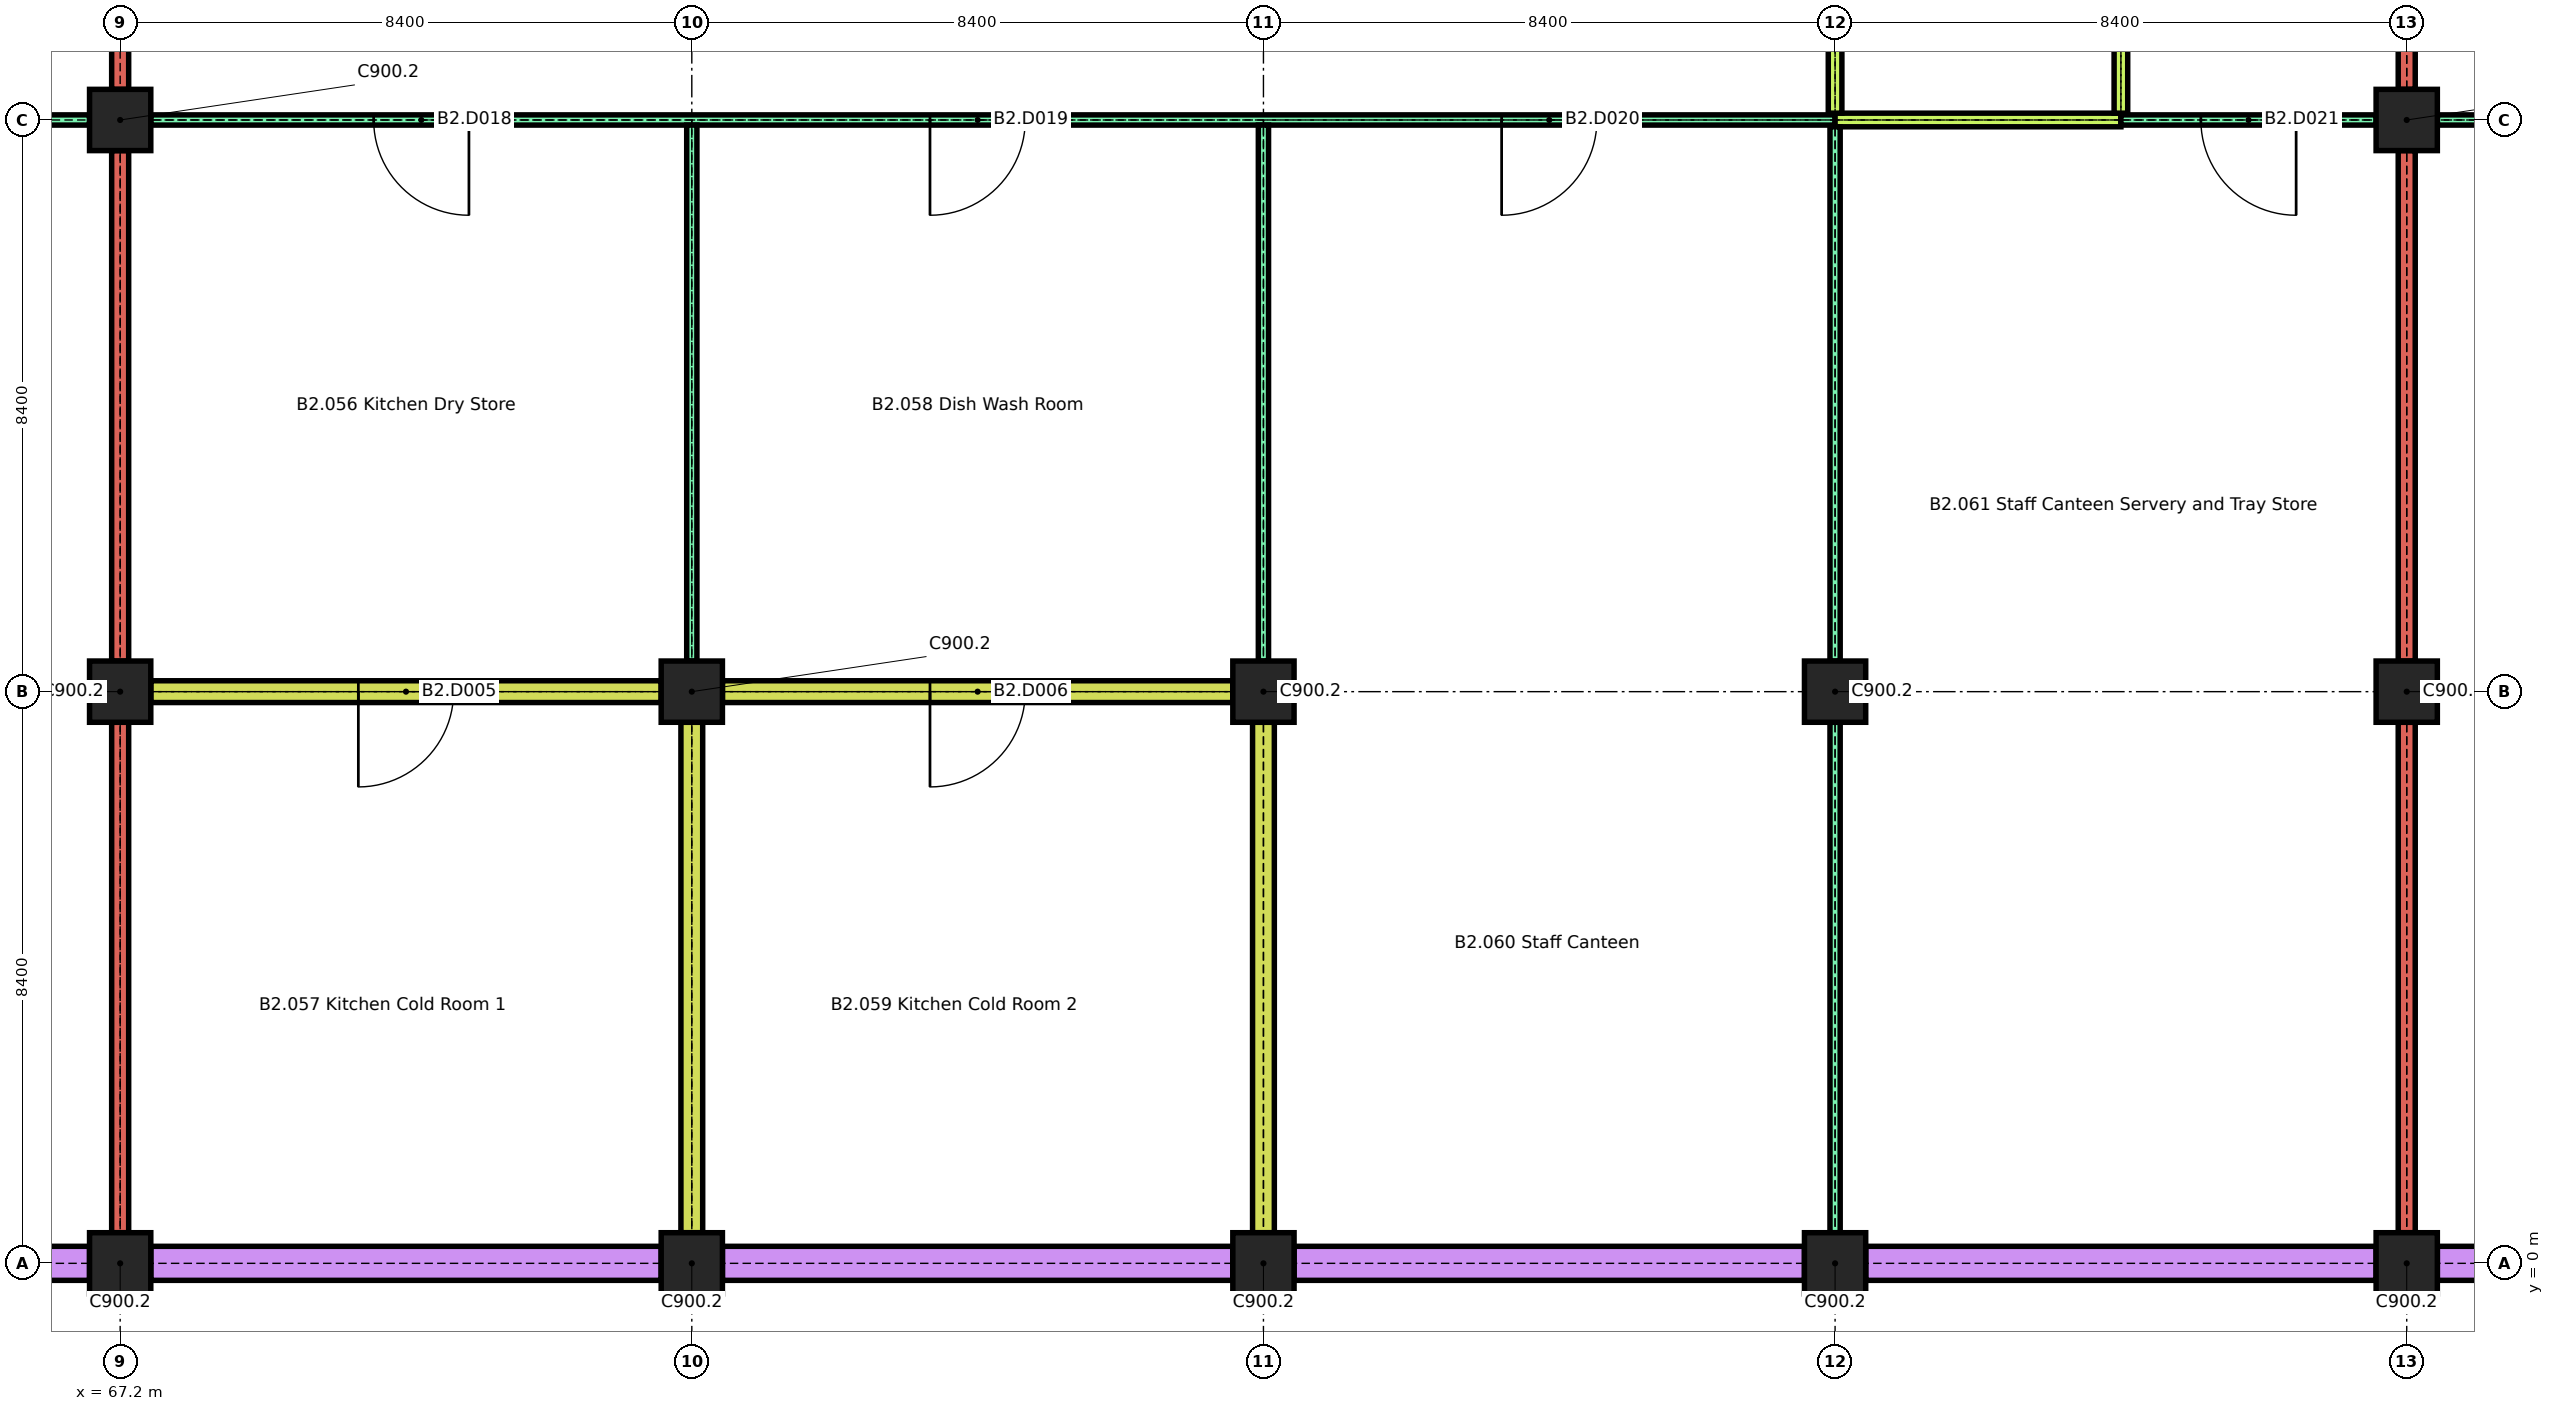
"""IFC4 building model, lengths in metres.
Left out: names, types, materials, properties, quantities, classifications, styles, units other than length and angle.
Written with IfcOpenShell. Run it as: python <this file> out.ifc"""

import sys

from ifc_helpers import new_model, si_unit, direction, frame, frame_2d, origin, origin_2d, place, context, subcontext, project, spatial, rectangle, extrude, element, fill, save


model = new_model("IFC4")
c1 = context("Model", 3, precision=1e-05, world=origin(), true_north=direction((0.0, 1.0)))
c2 = subcontext(c1, "Body", "Model", "MODEL_VIEW")
j1 = project(units=[si_unit("LENGTHUNIT", "METRE"), si_unit("PLANEANGLEUNIT", "RADIAN")], contexts=[c1])
p1 = place(None, origin())
s1 = spatial("IfcSite", under=j1, at=p1, CompositionType="ELEMENT")
p2 = place(p1, origin())
s2 = spatial("IfcBuilding", under=s1, at=p2, CompositionType="ELEMENT")
p3 = place(p2, frame((0.0, 0.0, -7.8)))
s3 = spatial("IfcBuildingStorey", under=s2, at=p3, CompositionType="ELEMENT", Elevation=-7.8)
for number, where, z_axis, x_axis in (
    (1, (67.2, 0.0, 0.0), (0.0, 0.0, 1.0), (1.0, 0.0, 0.0)),
    (2, (75.6, 0.0, 0.0), (0.0, 0.0, 1.0), (1.0, 0.0, 0.0)),
    (3, (84.0, 0.0, 0.0), (0.0, 0.0, 1.0), (1.0, 0.0, 0.0)),
    (4, (92.4, 0.0, 0.0), (0.0, 0.0, 1.0), (1.0, 0.0, 0.0)),
    (5, (100.8, 0.0, 0.0), (0.0, 0.0, 1.0), (1.0, 0.0, 0.0)),
    (6, (67.2, 8.4, 0.0), (0.0, 0.0, 1.0), (1.0, 0.0, 0.0)),
    (7, (75.6, 8.4, 0.0), (0.0, 0.0, 1.0), (1.0, 0.0, 0.0)),
    (8, (84.0, 8.4, 0.0), (0.0, 0.0, 1.0), (1.0, 0.0, 0.0)),
    (9, (92.4, 8.4, 0.0), (0.0, 0.0, 1.0), (1.0, 0.0, 0.0)),
    (10, (100.8, 8.4, 0.0), (0.0, 0.0, 1.0), (1.0, 0.0, 0.0)),
    (11, (67.2, 16.8, 0.0), (0.0, 0.0, 1.0), (1.0, 0.0, 0.0)),
    (12, (100.8, 16.8, 0.0), (0.0, 0.0, 1.0), (1.0, 0.0, 0.0)),
):
    element("IfcColumn", number, at=place(p3, frame(where, z_axis=z_axis, x_axis=x_axis)), inside=s3, PredefinedType="COLUMN", context=c2, shape_type="SweptSolid", body=[
        extrude(rectangle(XDim=0.9, YDim=0.9, at=origin_2d()), origin(), (0.0, 0.0, 1.0), 3.1),
    ])
for number, where, z_axis, x_axis in (
    (13, (59.25, 0.0, 0.0), (0.0, 0.0, 1.0), (1.0, 0.0, 0.0)),
    (14, (67.65, 0.0, 0.0), (0.0, 0.0, 1.0), (1.0, 0.0, 0.0)),
    (15, (76.05, 0.0, 0.0), (0.0, 0.0, 1.0), (1.0, 0.0, 0.0)),
    (16, (84.45, 0.0, 0.0), (0.0, 0.0, 1.0), (1.0, 0.0, 0.0)),
    (17, (92.85, 0.0, 0.0), (0.0, 0.0, 1.0), (1.0, 0.0, 0.0)),
    (18, (101.25, 0.0, 0.0), (0.0, 0.0, 1.0), (1.0, 0.0, 0.0)),
):
    element("IfcWall", number, at=place(p3, frame(where, z_axis=z_axis, x_axis=x_axis)), inside=s3, PredefinedType="SOLIDWALL", context=c2, shape_type="SweptSolid", body=[
        extrude(rectangle(XDim=7.5, YDim=0.5, at=frame_2d((3.75, 0.0))), origin(), (0.0, 0.0, 1.0), 3.1),
    ])
p4 = place(p3, frame((67.65, 8.4, 0.0), z_axis=(0.0, 0.0, 1.0), x_axis=(1.0, 0.0, 0.0)))
e19 = element("IfcWall", 19, at=p4, inside=s3, PredefinedType="SOLIDWALL", context=c2, shape_type="SweptSolid", body=[
    extrude(rectangle(XDim=7.5, YDim=0.32, at=frame_2d((3.75, 0.0))), origin(), (0.0, 0.0, 1.0), 3.1),
])
p5 = place(p4, frame((3.05, 0.0, 0.0)))
e20 = element("IfcOpeningElement", 20, at=p5, cuts=e19, PredefinedType="OPENING", context=c2, shape_type="SweptSolid", body=[
    extrude(rectangle(XDim=1.4, YDim=2.1, at=frame_2d((0.7, 1.05))), frame((0.0, 0.17, 0.0), z_axis=(0.0, -1.0, 0.0), x_axis=(1.0, 0.0, 0.0)), (0.0, 0.0, 1.0), 0.34),
])
p6 = place(p3, frame((76.05, 8.4, 0.0), z_axis=(0.0, 0.0, 1.0), x_axis=(1.0, 0.0, 0.0)))
e21 = element("IfcWall", 21, at=p6, inside=s3, PredefinedType="SOLIDWALL", context=c2, shape_type="SweptSolid", body=[
    extrude(rectangle(XDim=7.5, YDim=0.32, at=frame_2d((3.75, 0.0))), origin(), (0.0, 0.0, 1.0), 3.1),
])
p7 = place(p6, frame((3.05, 0.0, 0.0)))
e22 = element("IfcOpeningElement", 22, at=p7, cuts=e21, PredefinedType="OPENING", context=c2, shape_type="SweptSolid", body=[
    extrude(rectangle(XDim=1.4, YDim=2.1, at=frame_2d((0.7, 1.05))), frame((0.0, 0.17, 0.0), z_axis=(0.0, -1.0, 0.0), x_axis=(1.0, 0.0, 0.0)), (0.0, 0.0, 1.0), 0.34),
])
p8 = place(p3, frame((59.25, 16.8, 0.0), z_axis=(0.0, 0.0, 1.0), x_axis=(1.0, 0.0, 0.0)))
e23 = element("IfcWall", 23, at=p8, inside=s3, PredefinedType="PARTITIONING", context=c2, shape_type="SweptSolid", body=[
    extrude(rectangle(XDim=7.5, YDim=0.15, at=frame_2d((3.75, 0.0))), origin(), (0.0, 0.0, 1.0), 3.1),
])
p9 = place(p8, frame((3.05, 0.0, 0.0)))
e24 = element("IfcOpeningElement", 24, at=p9, cuts=e23, PredefinedType="OPENING", context=c2, shape_type="SweptSolid", body=[
    extrude(rectangle(XDim=1.4, YDim=2.1, at=frame_2d((0.7, 1.05))), frame((0.0, 0.085, 0.0), z_axis=(0.0, -1.0, 0.0), x_axis=(1.0, 0.0, 0.0)), (0.0, 0.0, 1.0), 0.17),
])
p10 = place(p3, frame((67.65, 16.8, 0.0), z_axis=(0.0, 0.0, 1.0), x_axis=(1.0, 0.0, 0.0)))
e25 = element("IfcWall", 25, at=p10, inside=s3, PredefinedType="PARTITIONING", context=c2, shape_type="SweptSolid", body=[
    extrude(rectangle(XDim=24.75, YDim=0.15, at=frame_2d((12.375, 0.0))), origin(), (0.0, 0.0, 1.0), 3.1),
])
p11 = place(p10, frame((3.275, 0.0, 0.0)))
e26 = element("IfcOpeningElement", 26, at=p11, cuts=e25, PredefinedType="OPENING", context=c2, shape_type="SweptSolid", body=[
    extrude(rectangle(XDim=1.4, YDim=2.1, at=frame_2d((0.7, 1.05))), frame((0.0, 0.085, 0.0), z_axis=(0.0, -1.0, 0.0), x_axis=(1.0, 0.0, 0.0)), (0.0, 0.0, 1.0), 0.17),
])
p12 = place(p10, frame((11.45, 0.0, 0.0)))
e27 = element("IfcOpeningElement", 27, at=p12, cuts=e25, PredefinedType="OPENING", context=c2, shape_type="SweptSolid", body=[
    extrude(rectangle(XDim=1.4, YDim=2.1, at=frame_2d((0.7, 1.05))), frame((0.0, 0.085, 0.0), z_axis=(0.0, -1.0, 0.0), x_axis=(1.0, 0.0, 0.0)), (0.0, 0.0, 1.0), 0.17),
])
p13 = place(p10, frame((19.85, 0.0, 0.0)))
e28 = element("IfcOpeningElement", 28, at=p13, cuts=e25, PredefinedType="OPENING", context=c2, shape_type="SweptSolid", body=[
    extrude(rectangle(XDim=1.4, YDim=2.1, at=frame_2d((0.7, 1.05))), frame((0.0, 0.085, 0.0), z_axis=(0.0, -1.0, 0.0), x_axis=(1.0, 0.0, 0.0)), (0.0, 0.0, 1.0), 0.17),
])
p14 = place(p3, frame((92.4, 16.8, 0.0), z_axis=(0.0, 0.0, 1.0), x_axis=(1.0, 0.0, 0.0)))
e29 = element("IfcWall", 29, at=p14, inside=s3, PredefinedType="PARTITIONING", context=c2, shape_type="SweptSolid", body=[
    extrude(rectangle(XDim=4.2, YDim=0.2, at=frame_2d((2.1, 0.0))), origin(), (0.0, 0.0, 1.0), 3.1),
])
p15 = place(p3, frame((96.6, 16.8, 0.0), z_axis=(0.0, 0.0, 1.0), x_axis=(1.0, 0.0, 0.0)))
e30 = element("IfcWall", 30, at=p15, inside=s3, PredefinedType="PARTITIONING", context=c2, shape_type="SweptSolid", body=[
    extrude(rectangle(XDim=3.75, YDim=0.15, at=frame_2d((1.875, 0.0))), origin(), (0.0, 0.0, 1.0), 3.1),
])
p16 = place(p15, frame((1.175, 0.0, 0.0)))
e31 = element("IfcOpeningElement", 31, at=p16, cuts=e30, PredefinedType="OPENING", context=c2, shape_type="SweptSolid", body=[
    extrude(rectangle(XDim=1.4, YDim=2.1, at=frame_2d((0.7, 1.05))), frame((0.0, 0.085, 0.0), z_axis=(0.0, -1.0, 0.0), x_axis=(1.0, 0.0, 0.0)), (0.0, 0.0, 1.0), 0.17),
])
p17 = place(p3, frame((101.25, 16.8, 0.0), z_axis=(0.0, 0.0, 1.0), x_axis=(1.0, 0.0, 0.0)))
e32 = element("IfcWall", 32, at=p17, inside=s3, PredefinedType="PARTITIONING", context=c2, shape_type="SweptSolid", body=[
    extrude(rectangle(XDim=7.5, YDim=0.15, at=frame_2d((3.75, 0.0))), origin(), (0.0, 0.0, 1.0), 3.1),
])
p18 = place(p17, frame((3.05, 0.0, 0.0)))
e33 = element("IfcOpeningElement", 33, at=p18, cuts=e32, PredefinedType="OPENING", context=c2, shape_type="SweptSolid", body=[
    extrude(rectangle(XDim=1.4, YDim=2.1, at=frame_2d((0.7, 1.05))), frame((0.0, 0.085, 0.0), z_axis=(0.0, -1.0, 0.0), x_axis=(1.0, 0.0, 0.0)), (0.0, 0.0, 1.0), 0.17),
])
for number, where, z_axis, x_axis in (
    (34, (67.2, 0.45, 0.0), (0.0, 0.0, 1.0), (0.0, 1.0, 0.0)),
    (35, (67.2, 8.85, 0.0), (0.0, 0.0, 1.0), (0.0, 1.0, 0.0)),
):
    element("IfcWall", number, at=place(p3, frame(where, z_axis=z_axis, x_axis=x_axis)), inside=s3, PredefinedType="SOLIDWALL", context=c2, shape_type="SweptSolid", body=[
        extrude(rectangle(XDim=7.5, YDim=0.25, at=frame_2d((3.75, 0.0))), origin(), (0.0, 0.0, 1.0), 3.1),
    ])
p19 = place(p3, frame((67.2, 17.25, 0.0), z_axis=(0.0, 0.0, 1.0), x_axis=(0.0, 1.0, 0.0)))
e36 = element("IfcWall", 36, at=p19, inside=s3, PredefinedType="SOLIDWALL", context=c2, shape_type="SweptSolid", body=[
    extrude(rectangle(XDim=12.75, YDim=0.25, at=frame_2d((6.375, 0.0))), origin(), (0.0, 0.0, 1.0), 3.1),
])
p20 = place(p19, frame((1.175, 0.0, 0.0)))
e37 = element("IfcOpeningElement", 37, at=p20, cuts=e36, PredefinedType="OPENING", context=c2, shape_type="SweptSolid", body=[
    extrude(rectangle(XDim=2.0, YDim=2.4, at=frame_2d((1.0, 1.2))), frame((0.0, 0.135, 0.0), z_axis=(0.0, -1.0, 0.0), x_axis=(1.0, 0.0, 0.0)), (0.0, 0.0, 1.0), 0.27),
])
p21 = place(p3, frame((75.6, 0.45, 0.0), z_axis=(0.0, 0.0, 1.0), x_axis=(0.0, 1.0, 0.0)))
e38 = element("IfcWall", 38, at=p21, inside=s3, PredefinedType="SOLIDWALL", context=c2, shape_type="SweptSolid", body=[
    extrude(rectangle(XDim=7.5, YDim=0.32, at=frame_2d((3.75, 0.0))), origin(), (0.0, 0.0, 1.0), 3.1),
])
p22 = place(p3, frame((75.6, 8.85, 0.0), z_axis=(0.0, 0.0, 1.0), x_axis=(0.0, 1.0, 0.0)))
e39 = element("IfcWall", 39, at=p22, inside=s3, PredefinedType="PARTITIONING", context=c2, shape_type="SweptSolid", body=[
    extrude(rectangle(XDim=7.875, YDim=0.15, at=frame_2d((3.938, 0.0))), origin(), (0.0, 0.0, 1.0), 3.1),
])
p23 = place(p3, frame((84.0, 0.45, 0.0), z_axis=(0.0, 0.0, 1.0), x_axis=(0.0, 1.0, 0.0)))
e40 = element("IfcWall", 40, at=p23, inside=s3, PredefinedType="SOLIDWALL", context=c2, shape_type="SweptSolid", body=[
    extrude(rectangle(XDim=7.5, YDim=0.32, at=frame_2d((3.75, 0.0))), origin(), (0.0, 0.0, 1.0), 3.1),
])
p24 = place(p3, frame((84.0, 8.85, 0.0), z_axis=(0.0, 0.0, 1.0), x_axis=(0.0, 1.0, 0.0)))
e41 = element("IfcWall", 41, at=p24, inside=s3, PredefinedType="PARTITIONING", context=c2, shape_type="SweptSolid", body=[
    extrude(rectangle(XDim=7.875, YDim=0.15, at=frame_2d((3.938, 0.0))), origin(), (0.0, 0.0, 1.0), 3.1),
])
p25 = place(p3, frame((92.4, 0.45, 0.0), z_axis=(0.0, 0.0, 1.0), x_axis=(0.0, 1.0, 0.0)))
e42 = element("IfcWall", 42, at=p25, inside=s3, PredefinedType="PARTITIONING", context=c2, shape_type="SweptSolid", body=[
    extrude(rectangle(XDim=7.5, YDim=0.15, at=frame_2d((3.75, 0.0))), origin(), (0.0, 0.0, 1.0), 3.1),
])
p26 = place(p3, frame((92.4, 8.85, 0.0), z_axis=(0.0, 0.0, 1.0), x_axis=(0.0, 1.0, 0.0)))
e43 = element("IfcWall", 43, at=p26, inside=s3, PredefinedType="PARTITIONING", context=c2, shape_type="SweptSolid", body=[
    extrude(rectangle(XDim=7.85, YDim=0.15, at=frame_2d((3.925, 0.0))), origin(), (0.0, 0.0, 1.0), 3.1),
])
p27 = place(p3, frame((92.4, 16.9, 0.0), z_axis=(0.0, 0.0, 1.0), x_axis=(0.0, 1.0, 0.0)))
e44 = element("IfcWall", 44, at=p27, inside=s3, PredefinedType="PARTITIONING", context=c2, shape_type="SweptSolid", body=[
    extrude(rectangle(XDim=4.5, YDim=0.2, at=frame_2d((2.25, 0.0))), origin(), (0.0, 0.0, 1.0), 3.1),
])
p28 = place(p27, frame((1.25, 0.0, 0.0)))
e45 = element("IfcOpeningElement", 45, at=p28, cuts=e44, PredefinedType="OPENING", context=c2, shape_type="SweptSolid", body=[
    extrude(rectangle(XDim=2.0, YDim=2.4, at=frame_2d((1.0, 1.2))), frame((0.0, 0.11, 0.0), z_axis=(0.0, -1.0, 0.0), x_axis=(1.0, 0.0, 0.0)), (0.0, 0.0, 1.0), 0.22),
])
p29 = place(p3, frame((96.6, 16.9, 0.0), z_axis=(0.0, 0.0, 1.0), x_axis=(0.0, 1.0, 0.0)))
e46 = element("IfcWall", 46, at=p29, inside=s3, PredefinedType="PARTITIONING", context=c2, shape_type="SweptSolid", body=[
    extrude(rectangle(XDim=4.5, YDim=0.2, at=frame_2d((2.25, 0.0))), origin(), (0.0, 0.0, 1.0), 3.1),
])
p30 = place(p29, frame((1.25, 0.0, 0.0)))
e47 = element("IfcOpeningElement", 47, at=p30, cuts=e46, PredefinedType="OPENING", context=c2, shape_type="SweptSolid", body=[
    extrude(rectangle(XDim=2.0, YDim=2.4, at=frame_2d((1.0, 1.2))), frame((0.0, 0.11, 0.0), z_axis=(0.0, -1.0, 0.0), x_axis=(1.0, 0.0, 0.0)), (0.0, 0.0, 1.0), 0.22),
])
for number, where, z_axis, x_axis in (
    (48, (100.8, 0.45, 0.0), (0.0, 0.0, 1.0), (0.0, 1.0, 0.0)),
    (49, (100.8, 8.85, 0.0), (0.0, 0.0, 1.0), (0.0, 1.0, 0.0)),
):
    element("IfcWall", number, at=place(p3, frame(where, z_axis=z_axis, x_axis=x_axis)), inside=s3, PredefinedType="SOLIDWALL", context=c2, shape_type="SweptSolid", body=[
        extrude(rectangle(XDim=7.5, YDim=0.25, at=frame_2d((3.75, 0.0))), origin(), (0.0, 0.0, 1.0), 3.1),
    ])
p31 = place(p3, frame((100.8, 17.25, 0.0), z_axis=(0.0, 0.0, 1.0), x_axis=(0.0, 1.0, 0.0)))
e50 = element("IfcWall", 50, at=p31, inside=s3, PredefinedType="SOLIDWALL", context=c2, shape_type="SweptSolid", body=[
    extrude(rectangle(XDim=4.275, YDim=0.25, at=frame_2d((2.137, 0.0))), origin(), (0.0, 0.0, 1.0), 3.1),
])
p32 = place(p31, frame((1.137, 0.0, 0.0)))
e51 = element("IfcOpeningElement", 51, at=p32, cuts=e50, PredefinedType="OPENING", context=c2, shape_type="SweptSolid", body=[
    extrude(rectangle(XDim=2.0, YDim=2.4, at=frame_2d((1.0, 1.2))), frame((0.0, 0.135, 0.0), z_axis=(0.0, -1.0, 0.0), x_axis=(1.0, 0.0, 0.0)), (0.0, 0.0, 1.0), 0.27),
])
p33 = place(p5, origin())
e52 = element("IfcDoor", 52, at=p33, inside=s3, OperationType="SINGLE_SWING_LEFT", PredefinedType="DOOR", context=c2, shape_type="SweptSolid", body=[
    extrude(rectangle(XDim=1.4, YDim=2.1, at=frame_2d((0.7, 1.05))), frame((0.0, 0.05, 0.0), z_axis=(0.0, -1.0, 0.0), x_axis=(1.0, 0.0, 0.0)), (0.0, 0.0, 1.0), 0.1),
])
fill(e20, e52)
p34 = place(p7, origin())
e53 = element("IfcDoor", 53, at=p34, inside=s3, OperationType="SINGLE_SWING_LEFT", PredefinedType="DOOR", context=c2, shape_type="SweptSolid", body=[
    extrude(rectangle(XDim=1.4, YDim=2.1, at=frame_2d((0.7, 1.05))), frame((0.0, 0.05, 0.0), z_axis=(0.0, -1.0, 0.0), x_axis=(1.0, 0.0, 0.0)), (0.0, 0.0, 1.0), 0.1),
])
fill(e22, e53)
p35 = place(p11, origin())
e54 = element("IfcDoor", 54, at=p35, inside=s3, OperationType="SINGLE_SWING_RIGHT", PredefinedType="DOOR", context=c2, shape_type="SweptSolid", body=[
    extrude(rectangle(XDim=1.4, YDim=2.1, at=frame_2d((0.7, 1.05))), frame((0.0, 0.025, 0.0), z_axis=(0.0, -1.0, 0.0), x_axis=(1.0, 0.0, 0.0)), (0.0, 0.0, 1.0), 0.05),
])
fill(e26, e54)
p36 = place(p12, origin())
e55 = element("IfcDoor", 55, at=p36, inside=s3, OperationType="SINGLE_SWING_LEFT", PredefinedType="DOOR", context=c2, shape_type="SweptSolid", body=[
    extrude(rectangle(XDim=1.4, YDim=2.1, at=frame_2d((0.7, 1.05))), frame((0.0, 0.025, 0.0), z_axis=(0.0, -1.0, 0.0), x_axis=(1.0, 0.0, 0.0)), (0.0, 0.0, 1.0), 0.05),
])
fill(e27, e55)
p37 = place(p13, origin())
e56 = element("IfcDoor", 56, at=p37, inside=s3, OperationType="SINGLE_SWING_LEFT", PredefinedType="DOOR", context=c2, shape_type="SweptSolid", body=[
    extrude(rectangle(XDim=1.4, YDim=2.1, at=frame_2d((0.7, 1.05))), frame((0.0, 0.025, 0.0), z_axis=(0.0, -1.0, 0.0), x_axis=(1.0, 0.0, 0.0)), (0.0, 0.0, 1.0), 0.05),
])
fill(e28, e56)
p38 = place(p16, origin())
e57 = element("IfcDoor", 57, at=p38, inside=s3, OperationType="SINGLE_SWING_RIGHT", PredefinedType="DOOR", context=c2, shape_type="SweptSolid", body=[
    extrude(rectangle(XDim=1.4, YDim=2.1, at=frame_2d((0.7, 1.05))), frame((0.0, 0.025, 0.0), z_axis=(0.0, -1.0, 0.0), x_axis=(1.0, 0.0, 0.0)), (0.0, 0.0, 1.0), 0.05),
])
fill(e31, e57)
save(model, sys.argv[1])
